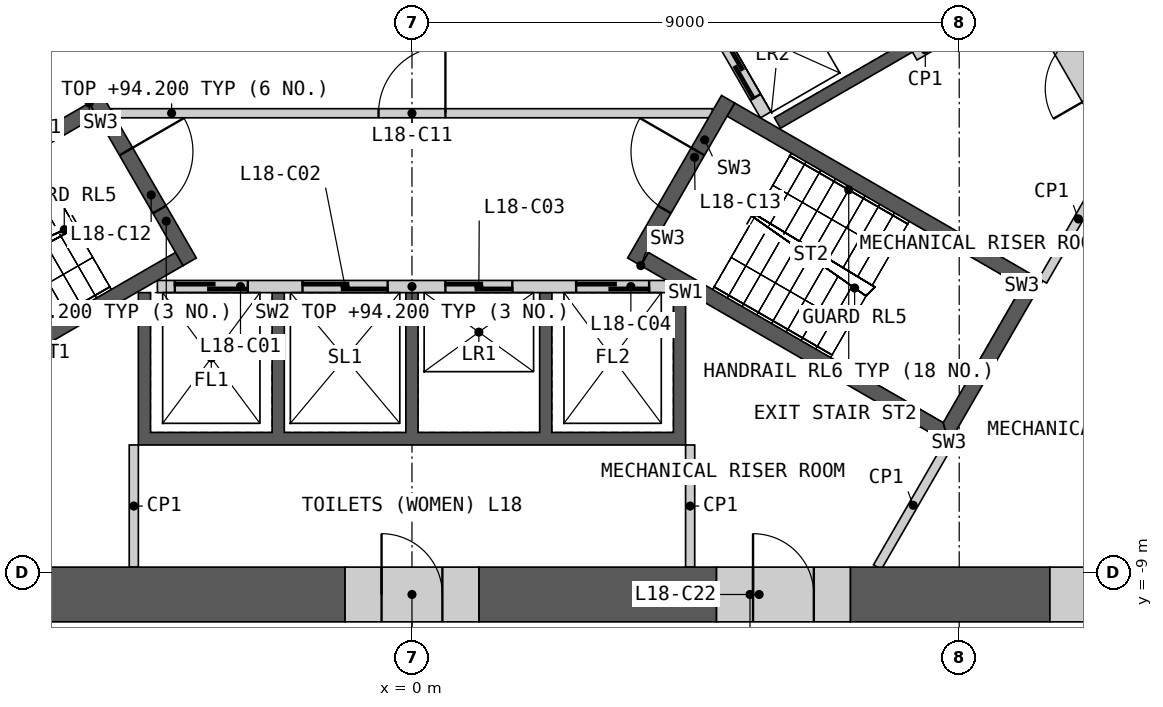
"""IFC4 building model, lengths in metres.
Left out: names, types, materials, properties, quantities, classifications, styles, units other than length and angle.
Written with IfcOpenShell. Run it as: python <this file> out.ifc"""

import sys

from ifc_helpers import new_model, si_unit, direction, frame, frame_2d, origin, place, context, subcontext, project, spatial, polyline, rectangle, outline, extrude, element, fill, save


model = new_model("IFC4")
c1 = context("Model", 3, precision=1e-05, world=origin(), true_north=direction((0.0, 1.0)))
c2 = subcontext(c1, "Body", "Model", "MODEL_VIEW")
j1 = project(units=[si_unit("LENGTHUNIT", "METRE"), si_unit("PLANEANGLEUNIT", "RADIAN")], contexts=[c1])
p1 = place(None, origin())
s1 = spatial("IfcSite", under=j1, at=p1, CompositionType="ELEMENT")
p2 = place(p1, origin())
s2 = spatial("IfcBuilding", under=s1, at=p2, CompositionType="ELEMENT")
p3 = place(p2, frame((0.0, 0.0, 84.6)))
s3 = spatial("IfcBuildingStorey", under=s2, at=p3, CompositionType="ELEMENT", Elevation=84.6)
p4 = place(p3, origin())
e1 = element("IfcWall", 1, at=p4, inside=s3, PredefinedType="SHEAR", context=c2, shape_type="SweptSolid", body=[
    extrude(outline(polyline([(4.5, -4.4), (4.5, -6.906), (-4.5, -6.906), (-4.5, -4.4), (-4.3, -4.4), (-4.3, -6.7), (-2.3, -6.7), (-2.3, -4.4), (-2.1, -4.4), (-2.1, -6.7), (-0.1, -6.7), (-0.1, -4.4), (0.1, -4.4), (0.1, -6.7), (2.1, -6.7), (2.1, -4.4), (2.3, -4.4), (2.3, -6.7), (4.3, -6.7), (4.3, -4.4), (4.5, -4.4)])), origin(), (0.0, 0.0, 1.0), 9.6),
])
p5 = place(p3, frame((-4.187, -4.3, 0.0), z_axis=(0.0, 0.0, 1.0), x_axis=(1.0, 0.0, 0.0)))
e2 = element("IfcWall", 2, at=p5, inside=s3, PredefinedType="SOLIDWALL", context=c2, shape_type="SweptSolid", body=[
    extrude(rectangle(XDim=8.373, YDim=0.2, at=frame_2d((4.187, 0.0))), origin(), (0.0, 0.0, 1.0), 9.6),
])
p6 = place(p5, frame((0.287, 0.0, 0.0)))
e3 = element("IfcOpeningElement", 3, at=p6, cuts=e2, PredefinedType="OPENING", context=c2, shape_type="SweptSolid", body=[
    extrude(rectangle(XDim=1.2, YDim=2.1, at=frame_2d((0.6, 1.05))), frame((0.0, 0.11, 0.0), z_axis=(0.0, -1.0, 0.0), x_axis=(1.0, 0.0, 0.0)), (0.0, 0.0, 1.0), 0.22),
])
p7 = place(p5, frame((2.387, 0.0, 0.0)))
e4 = element("IfcOpeningElement", 4, at=p7, cuts=e2, PredefinedType="OPENING", context=c2, shape_type="SweptSolid", body=[
    extrude(rectangle(XDim=1.4, YDim=2.1, at=frame_2d((0.7, 1.05))), frame((0.0, 0.11, 0.0), z_axis=(0.0, -1.0, 0.0), x_axis=(1.0, 0.0, 0.0)), (0.0, 0.0, 1.0), 0.22),
])
p8 = place(p5, frame((4.737, 0.0, 0.0)))
e5 = element("IfcOpeningElement", 5, at=p8, cuts=e2, PredefinedType="OPENING", context=c2, shape_type="SweptSolid", body=[
    extrude(rectangle(XDim=1.1, YDim=2.1, at=frame_2d((0.55, 1.05))), frame((0.0, 0.11, 0.0), z_axis=(0.0, -1.0, 0.0), x_axis=(1.0, 0.0, 0.0)), (0.0, 0.0, 1.0), 0.22),
])
p9 = place(p5, frame((6.887, 0.0, 0.0)))
e6 = element("IfcOpeningElement", 6, at=p9, cuts=e2, PredefinedType="OPENING", context=c2, shape_type="SweptSolid", body=[
    extrude(rectangle(XDim=1.2, YDim=2.1, at=frame_2d((0.6, 1.05))), frame((0.0, 0.11, 0.0), z_axis=(0.0, -1.0, 0.0), x_axis=(1.0, 0.0, 0.0)), (0.0, 0.0, 1.0), 0.22),
])
p10 = place(p3, origin())
e7 = element("IfcWall", 7, at=p10, inside=s3, PredefinedType="SHEAR", context=c2, shape_type="SweptSolid", body=[
    extrude(outline(polyline([(2.66, 4.192), (4.831, 5.445), (8.231, -0.444), (6.061, -1.697), (5.96, -1.524), (7.952, -0.374), (6.952, 1.358), (4.96, 0.208), (4.861, 0.381), (6.852, 1.531), (5.852, 3.263), (3.861, 2.113), (3.76, 2.287), (5.752, 3.437), (4.752, 5.169), (2.76, 4.019), (2.66, 4.192)])), origin(), (0.0, 0.0, 1.0), 9.6),
])
p11 = place(p3, frame((5.817, -1.476, 0.0), z_axis=(0.0, 0.0, 1.0), x_axis=(-0.500002616675, 0.866023893041, 0.0)))
e8 = element("IfcWall", 8, at=p11, inside=s3, PredefinedType="SOLIDWALL", context=c2, shape_type="SweptSolid", body=[
    extrude(rectangle(XDim=8.373, YDim=0.2, at=frame_2d((4.187, 0.0))), origin(), (0.0, 0.0, 1.0), 9.6),
])
p12 = place(p11, frame((0.337, 0.0, 0.0)))
e9 = element("IfcOpeningElement", 9, at=p12, cuts=e8, PredefinedType="OPENING", context=c2, shape_type="SweptSolid", body=[
    extrude(rectangle(XDim=1.1, YDim=2.1, at=frame_2d((0.55, 1.05))), frame((0.0, 0.11, 0.0), z_axis=(0.0, -1.0, 0.0), x_axis=(1.0, 0.0, 0.0)), (0.0, 0.0, 1.0), 0.22),
])
p13 = place(p11, frame((2.537, 0.0, 0.0)))
e10 = element("IfcOpeningElement", 10, at=p13, cuts=e8, PredefinedType="OPENING", context=c2, shape_type="SweptSolid", body=[
    extrude(rectangle(XDim=1.1, YDim=2.1, at=frame_2d((0.55, 1.05))), frame((0.0, 0.11, 0.0), z_axis=(0.0, -1.0, 0.0), x_axis=(1.0, 0.0, 0.0)), (0.0, 0.0, 1.0), 0.22),
])
p14 = place(p11, frame((4.737, 0.0, 0.0)))
e11 = element("IfcOpeningElement", 11, at=p14, cuts=e8, PredefinedType="OPENING", context=c2, shape_type="SweptSolid", body=[
    extrude(rectangle(XDim=1.1, YDim=2.1, at=frame_2d((0.55, 1.05))), frame((0.0, 0.11, 0.0), z_axis=(0.0, -1.0, 0.0), x_axis=(1.0, 0.0, 0.0)), (0.0, 0.0, 1.0), 0.22),
])
p15 = place(p11, frame((7.037, 0.0, 0.0)))
e12 = element("IfcOpeningElement", 12, at=p15, cuts=e8, PredefinedType="OPENING", context=c2, shape_type="SweptSolid", body=[
    extrude(rectangle(XDim=0.9, YDim=2.1, at=frame_2d((0.45, 1.05))), frame((0.0, 0.11, 0.0), z_axis=(0.0, -1.0, 0.0), x_axis=(1.0, 0.0, 0.0)), (0.0, 0.0, 1.0), 0.22),
])
p16 = place(p3, frame((-4.941, -1.45, 0.0), z_axis=(0.0, 0.0, 1.0), x_axis=(1.0, 0.0, 0.0)))
e13 = element("IfcWall", 13, at=p16, inside=s3, PredefinedType="PARTITIONING", context=c2, shape_type="SweptSolid", body=[
    extrude(rectangle(XDim=9.882, YDim=0.15, at=frame_2d((4.941, 0.0))), origin(), (0.0, 0.0, 1.0), 9.6),
])
p17 = place(p16, frame((4.391, 0.0, 0.0)))
e14 = element("IfcOpeningElement", 14, at=p17, cuts=e13, PredefinedType="OPENING", context=c2, shape_type="SweptSolid", body=[
    extrude(rectangle(XDim=1.1, YDim=2.1, at=frame_2d((0.55, 1.05))), frame((0.0, 0.085, 0.0), z_axis=(0.0, -1.0, 0.0), x_axis=(1.0, 0.0, 0.0)), (0.0, 0.0, 1.0), 0.17),
])
p18 = place(p3, origin())
e15 = element("IfcWall", 15, at=p18, inside=s3, PredefinedType="SHEAR", context=c2, shape_type="SweptSolid", body=[
    extrude(outline(polyline([(-5.307, -1.281), (-10.374, -4.206), (-10.032, -4.298), (-5.182, -1.498), (-5.307, -1.281)])), origin(), (0.0, 0.0, 1.0), 9.6),
])
p19 = place(p3, origin())
e16 = element("IfcWall", 16, at=p19, inside=s3, PredefinedType="SHEAR", context=c2, shape_type="SweptSolid", body=[
    extrude(outline(polyline([(-8.738, -6.539), (-8.83, -6.881), (-3.763, -3.956), (-3.888, -3.739), (-8.738, -6.539)])), origin(), (0.0, 0.0, 1.0), 9.6),
])
p20 = place(p3, frame((-5.199, -1.219, 0.0), z_axis=(0.0, 0.0, 1.0), x_axis=(0.499982516597, -0.866035497597, 0.0)))
e17 = element("IfcWall", 17, at=p20, inside=s3, PredefinedType="SHEAR", context=c2, shape_type="SweptSolid", body=[
    extrude(rectangle(XDim=3.088, YDim=0.25, at=frame_2d((1.544, 0.0))), origin(), (0.0, 0.0, 1.0), 9.6),
])
p21 = place(p20, frame((0.994, 0.0, 0.0)))
e18 = element("IfcOpeningElement", 18, at=p21, cuts=e17, PredefinedType="OPENING", context=c2, shape_type="SweptSolid", body=[
    extrude(rectangle(XDim=1.1, YDim=2.1, at=frame_2d((0.55, 1.05))), frame((0.0, 0.135, 0.0), z_axis=(0.0, -1.0, 0.0), x_axis=(1.0, 0.0, 0.0)), (0.0, 0.0, 1.0), 0.27),
])
p22 = place(p3, origin())
e19 = element("IfcWall", 19, at=p22, inside=s3, PredefinedType="SHEAR", context=c2, shape_type="SweptSolid", body=[
    extrude(outline(polyline([(3.763, -3.956), (8.83, -6.881), (8.738, -6.539), (3.888, -3.739), (3.763, -3.956)])), origin(), (0.0, 0.0, 1.0), 9.6),
])
p23 = place(p3, origin())
e20 = element("IfcWall", 20, at=p23, inside=s3, PredefinedType="SHEAR", context=c2, shape_type="SweptSolid", body=[
    extrude(outline(polyline([(8.83, -6.881), (10.374, -4.206), (10.032, -4.298), (8.738, -6.539), (8.83, -6.881)])), origin(), (0.0, 0.0, 1.0), 9.6),
])
p24 = place(p3, origin())
e21 = element("IfcWall", 21, at=p24, inside=s3, PredefinedType="SHEAR", context=c2, shape_type="SweptSolid", body=[
    extrude(outline(polyline([(10.032, -4.298), (10.374, -4.206), (5.307, -1.281), (5.182, -1.498), (10.032, -4.298)])), origin(), (0.0, 0.0, 1.0), 9.6),
])
p25 = place(p3, frame((3.655, -3.893, 0.0), z_axis=(0.0, 0.0, 1.0), x_axis=(0.499982516597, 0.866035497597, 0.0)))
e22 = element("IfcWall", 22, at=p25, inside=s3, PredefinedType="SHEAR", context=c2, shape_type="SweptSolid", body=[
    extrude(rectangle(XDim=3.088, YDim=0.25, at=frame_2d((1.544, 0.0))), origin(), (0.0, 0.0, 1.0), 9.6),
])
p26 = place(p25, frame((0.994, 0.0, 0.0)))
e23 = element("IfcOpeningElement", 23, at=p26, cuts=e22, PredefinedType="OPENING", context=c2, shape_type="SweptSolid", body=[
    extrude(rectangle(XDim=1.1, YDim=2.1, at=frame_2d((0.55, 1.05))), frame((0.0, 0.135, 0.0), z_axis=(0.0, -1.0, 0.0), x_axis=(1.0, 0.0, 0.0)), (0.0, 0.0, 1.0), 0.27),
])
for number, where, z_axis, x_axis in (
    (24, (4.575, -6.906, 0.0), (0.0, 0.0, 1.0), (0.0, -1.0, 0.0)),
    (25, (-4.575, -6.906, 0.0), (0.0, 0.0, 1.0), (0.0, -1.0, 0.0)),
):
    element("IfcWall", number, at=place(p3, frame(where, z_axis=z_axis, x_axis=x_axis)), inside=s3, PredefinedType="PARTITIONING", context=c2, shape_type="SweptSolid", body=[
        extrude(rectangle(XDim=2.009, YDim=0.15, at=frame_2d((1.004, 0.0))), origin(), (0.0, 0.0, 1.0), 9.6),
    ])
p27 = place(p3, frame((8.268, -0.509, 0.0), z_axis=(0.0, 0.0, 1.0), x_axis=(0.866035824272, 0.499981950752, 0.0)))
e26 = element("IfcWall", 26, at=p27, inside=s3, PredefinedType="PARTITIONING", context=c2, shape_type="SweptSolid", body=[
    extrude(rectangle(XDim=2.009, YDim=0.15, at=frame_2d((1.004, 0.0))), origin(), (0.0, 0.0, 1.0), 9.6),
])
p28 = place(p3, frame((8.83, -6.881, 0.0), z_axis=(0.0, 0.0, 1.0), x_axis=(-0.500073279432, -0.865983091751, 0.0)))
e27 = element("IfcWall", 27, at=p28, inside=s3, PredefinedType="PARTITIONING", context=c2, shape_type="SweptSolid", body=[
    extrude(rectangle(XDim=2.349, YDim=0.15, at=frame_2d((1.175, 0.0))), origin(), (0.0, 0.0, 1.0), 9.6),
])
p29 = place(p3, frame((10.374, -4.206, 0.0), z_axis=(0.0, 0.0, 1.0), x_axis=(0.499995339376, 0.86602809458, 0.0)))
e28 = element("IfcWall", 28, at=p29, inside=s3, PredefinedType="PARTITIONING", context=c2, shape_type="SweptSolid", body=[
    extrude(rectangle(XDim=2.349, YDim=0.15, at=frame_2d((1.175, 0.0))), origin(), (0.0, 0.0, 1.0), 9.6),
])
p30 = place(p3, frame((-15.441, -9.365, 0.0), z_axis=(0.0, 0.0, 1.0), x_axis=(1.0, 0.0, 0.0)))
e29 = element("IfcWall", 29, at=p30, inside=s3, PredefinedType="SHEAR", context=c2, shape_type="SweptSolid", body=[
    extrude(rectangle(XDim=14.341, YDim=0.9, at=frame_2d((7.17, 0.0))), origin(), (0.0, 0.0, 1.0), 9.6),
])
p31 = place(p3, frame((1.1, -9.365, 0.0), z_axis=(0.0, 0.0, 1.0), x_axis=(1.0, 0.0, 0.0)))
e30 = element("IfcWall", 30, at=p31, inside=s3, PredefinedType="SHEAR", context=c2, shape_type="SweptSolid", body=[
    extrude(rectangle(XDim=3.909, YDim=0.9, at=frame_2d((1.955, 0.0))), origin(), (0.0, 0.0, 1.0), 9.6),
])
p32 = place(p3, frame((7.209, -9.365, 0.0), z_axis=(0.0, 0.0, 1.0), x_axis=(1.0, 0.0, 0.0)))
e31 = element("IfcWall", 31, at=p32, inside=s3, PredefinedType="SHEAR", context=c2, shape_type="SweptSolid", body=[
    extrude(rectangle(XDim=3.282, YDim=0.9, at=frame_2d((1.641, 0.0))), origin(), (0.0, 0.0, 1.0), 9.6),
])
p33 = place(p3, frame((-1.1, -9.365, 0.0), z_axis=(0.0, 0.0, 1.0), x_axis=(1.0, 0.0, 0.0)))
e32 = element("IfcWall", 32, at=p33, inside=s3, PredefinedType="SHEAR", context=c2, shape_type="SweptSolid", body=[
    extrude(rectangle(XDim=2.2, YDim=0.9, at=frame_2d((1.1, 0.0))), origin(), (0.0, 0.0, 1.0), 9.6),
])
p34 = place(p33, frame((0.6, 0.0, 0.0)))
e33 = element("IfcOpeningElement", 33, at=p34, cuts=e32, PredefinedType="OPENING", context=c2, shape_type="SweptSolid", body=[
    extrude(rectangle(XDim=1.0, YDim=2.1, at=frame_2d((0.5, 1.05))), frame((0.0, 0.46, 0.0), z_axis=(0.0, -1.0, 0.0), x_axis=(1.0, 0.0, 0.0)), (0.0, 0.0, 1.0), 0.92),
])
p35 = place(p3, frame((10.491, -9.365, 0.0), z_axis=(0.0, 0.0, 1.0), x_axis=(1.0, 0.0, 0.0)))
e34 = element("IfcWall", 34, at=p35, inside=s3, PredefinedType="SHEAR", context=c2, shape_type="SweptSolid", body=[
    extrude(rectangle(XDim=2.2, YDim=0.9, at=frame_2d((1.1, 0.0))), origin(), (0.0, 0.0, 1.0), 9.6),
])
p36 = place(p35, frame((0.6, 0.0, 0.0)))
e35 = element("IfcOpeningElement", 35, at=p36, cuts=e34, PredefinedType="OPENING", context=c2, shape_type="SweptSolid", body=[
    extrude(rectangle(XDim=1.0, YDim=2.1, at=frame_2d((0.5, 1.05))), frame((0.0, 0.46, 0.0), z_axis=(0.0, -1.0, 0.0), x_axis=(1.0, 0.0, 0.0)), (0.0, 0.0, 1.0), 0.92),
])
p37 = place(p3, frame((11.715, -1.561, 0.0), z_axis=(0.0, 0.0, 1.0), x_axis=(-0.499946605688, 0.86605622881, 0.0)))
e36 = element("IfcWall", 36, at=p37, inside=s3, PredefinedType="SHEAR", context=c2, shape_type="SweptSolid", body=[
    extrude(rectangle(XDim=2.2, YDim=0.9, at=frame_2d((1.1, 0.0))), origin(), (0.0, 0.0, 1.0), 9.6),
])
p38 = place(p37, frame((0.6, 0.0, 0.0)))
e37 = element("IfcOpeningElement", 37, at=p38, cuts=e36, PredefinedType="OPENING", context=c2, shape_type="SweptSolid", body=[
    extrude(rectangle(XDim=1.0, YDim=2.1, at=frame_2d((0.5, 1.05))), frame((0.0, 0.46, 0.0), z_axis=(0.0, -1.0, 0.0), x_axis=(1.0, 0.0, 0.0)), (0.0, 0.0, 1.0), 0.92),
])
p39 = place(p3, frame((5.009, -9.365, 0.0), z_axis=(0.0, 0.0, 1.0), x_axis=(1.0, 0.0, 0.0)))
e38 = element("IfcWall", 38, at=p39, inside=s3, PredefinedType="SHEAR", context=c2, shape_type="SweptSolid", body=[
    extrude(rectangle(XDim=2.2, YDim=0.9, at=frame_2d((1.1, 0.0))), origin(), (0.0, 0.0, 1.0), 9.6),
])
p40 = place(p39, frame((0.6, 0.0, 0.0)))
e39 = element("IfcOpeningElement", 39, at=p40, cuts=e38, PredefinedType="OPENING", context=c2, shape_type="SweptSolid", body=[
    extrude(rectangle(XDim=1.0, YDim=2.1, at=frame_2d((0.5, 1.05))), frame((0.0, 0.46, 0.0), z_axis=(0.0, -1.0, 0.0), x_axis=(1.0, 0.0, 0.0)), (0.0, 0.0, 1.0), 0.92),
])
p41 = place(p3, frame((10.719, 5.865, 0.0), z_axis=(0.0, 0.0, 1.0), x_axis=(0.49999175339, -0.866030164915, 0.0)))
e40 = element("IfcWall", 40, at=p41, inside=s3, PredefinedType="PARTITIONING", context=c2, shape_type="SweptSolid", body=[
    extrude(rectangle(XDim=10.019, YDim=0.2, at=frame_2d((5.009, 0.0))), origin(), (0.0, 0.0, 1.0), 9.6),
])
p42 = place(p6, origin())
e41 = element("IfcDoor", 41, at=p42, inside=s3, OperationType="SLIDING_TO_LEFT", PredefinedType="DOOR", context=c2, shape_type="SweptSolid", body=[
    extrude(rectangle(XDim=1.2, YDim=2.1, at=frame_2d((0.6, 1.05))), frame((0.0, 0.025, 0.0), z_axis=(0.0, -1.0, 0.0), x_axis=(1.0, 0.0, 0.0)), (0.0, 0.0, 1.0), 0.05),
])
fill(e3, e41)
p43 = place(p7, origin())
e42 = element("IfcDoor", 42, at=p43, inside=s3, OperationType="SLIDING_TO_LEFT", PredefinedType="DOOR", context=c2, shape_type="SweptSolid", body=[
    extrude(rectangle(XDim=1.4, YDim=2.1, at=frame_2d((0.7, 1.05))), frame((0.0, 0.025, 0.0), z_axis=(0.0, -1.0, 0.0), x_axis=(1.0, 0.0, 0.0)), (0.0, 0.0, 1.0), 0.05),
])
fill(e4, e42)
p44 = place(p8, origin())
e43 = element("IfcDoor", 43, at=p44, inside=s3, OperationType="SLIDING_TO_LEFT", PredefinedType="DOOR", context=c2, shape_type="SweptSolid", body=[
    extrude(rectangle(XDim=1.1, YDim=2.1, at=frame_2d((0.55, 1.05))), frame((0.0, 0.025, 0.0), z_axis=(0.0, -1.0, 0.0), x_axis=(1.0, 0.0, 0.0)), (0.0, 0.0, 1.0), 0.05),
])
fill(e5, e43)
p45 = place(p9, origin())
e44 = element("IfcDoor", 44, at=p45, inside=s3, OperationType="SLIDING_TO_LEFT", PredefinedType="DOOR", context=c2, shape_type="SweptSolid", body=[
    extrude(rectangle(XDim=1.2, YDim=2.1, at=frame_2d((0.6, 1.05))), frame((0.0, 0.025, 0.0), z_axis=(0.0, -1.0, 0.0), x_axis=(1.0, 0.0, 0.0)), (0.0, 0.0, 1.0), 0.05),
])
fill(e6, e44)
p46 = place(p12, origin())
e45 = element("IfcDoor", 45, at=p46, inside=s3, OperationType="SLIDING_TO_LEFT", PredefinedType="DOOR", context=c2, shape_type="SweptSolid", body=[
    extrude(rectangle(XDim=1.1, YDim=2.1, at=frame_2d((0.55, 1.05))), frame((0.0, 0.025, 0.0), z_axis=(0.0, -1.0, 0.0), x_axis=(1.0, 0.0, 0.0)), (0.0, 0.0, 1.0), 0.05),
])
fill(e9, e45)
p47 = place(p17, origin())
e46 = element("IfcDoor", 46, at=p47, inside=s3, OperationType="SINGLE_SWING_RIGHT", PredefinedType="DOOR", context=c2, shape_type="SweptSolid", body=[
    extrude(rectangle(XDim=1.1, YDim=2.1, at=frame_2d((0.55, 1.05))), frame((0.0, 0.025, 0.0), z_axis=(0.0, -1.0, 0.0), x_axis=(1.0, 0.0, 0.0)), (0.0, 0.0, 1.0), 0.05),
])
fill(e14, e46)
p48 = place(p21, origin())
e47 = element("IfcDoor", 47, at=p48, inside=s3, OperationType="SINGLE_SWING_LEFT", PredefinedType="DOOR", context=c2, shape_type="SweptSolid", body=[
    extrude(rectangle(XDim=1.1, YDim=2.1, at=frame_2d((0.55, 1.05))), frame((0.0, 0.025, 0.0), z_axis=(0.0, -1.0, 0.0), x_axis=(1.0, 0.0, 0.0)), (0.0, 0.0, 1.0), 0.05),
])
fill(e18, e47)
p49 = place(p26, origin())
e48 = element("IfcDoor", 48, at=p49, inside=s3, OperationType="SINGLE_SWING_RIGHT", PredefinedType="DOOR", context=c2, shape_type="SweptSolid", body=[
    extrude(rectangle(XDim=1.1, YDim=2.1, at=frame_2d((0.55, 1.05))), frame((0.0, 0.025, 0.0), z_axis=(0.0, -1.0, 0.0), x_axis=(1.0, 0.0, 0.0)), (0.0, 0.0, 1.0), 0.05),
])
fill(e23, e48)
p50 = place(p34, origin())
e49 = element("IfcDoor", 49, at=p50, inside=s3, OperationType="SINGLE_SWING_LEFT", PredefinedType="DOOR", context=c2, shape_type="SweptSolid", body=[
    extrude(rectangle(XDim=1.0, YDim=2.1, at=frame_2d((0.5, 1.05))), frame((0.0, 0.205, 0.0), z_axis=(0.0, -1.0, 0.0), x_axis=(1.0, 0.0, 0.0)), (0.0, 0.0, 1.0), 0.05),
])
fill(e33, e49)
p51 = place(p38, origin())
e50 = element("IfcDoor", 50, at=p51, inside=s3, OperationType="SINGLE_SWING_LEFT", PredefinedType="DOOR", context=c2, shape_type="SweptSolid", body=[
    extrude(rectangle(XDim=1.0, YDim=2.1, at=frame_2d((0.5, 1.05))), frame((0.0, 0.205, 0.0), z_axis=(0.0, -1.0, 0.0), x_axis=(1.0, 0.0, 0.0)), (0.0, 0.0, 1.0), 0.05),
])
fill(e37, e50)
p52 = place(p40, origin())
e51 = element("IfcDoor", 51, at=p52, inside=s3, OperationType="SINGLE_SWING_LEFT", PredefinedType="DOOR", context=c2, shape_type="SweptSolid", body=[
    extrude(rectangle(XDim=1.0, YDim=2.1, at=frame_2d((0.5, 1.05))), frame((0.0, 0.205, 0.0), z_axis=(0.0, -1.0, 0.0), x_axis=(1.0, 0.0, 0.0)), (0.0, 0.0, 1.0), 0.05),
])
fill(e39, e51)
save(model, sys.argv[1])
